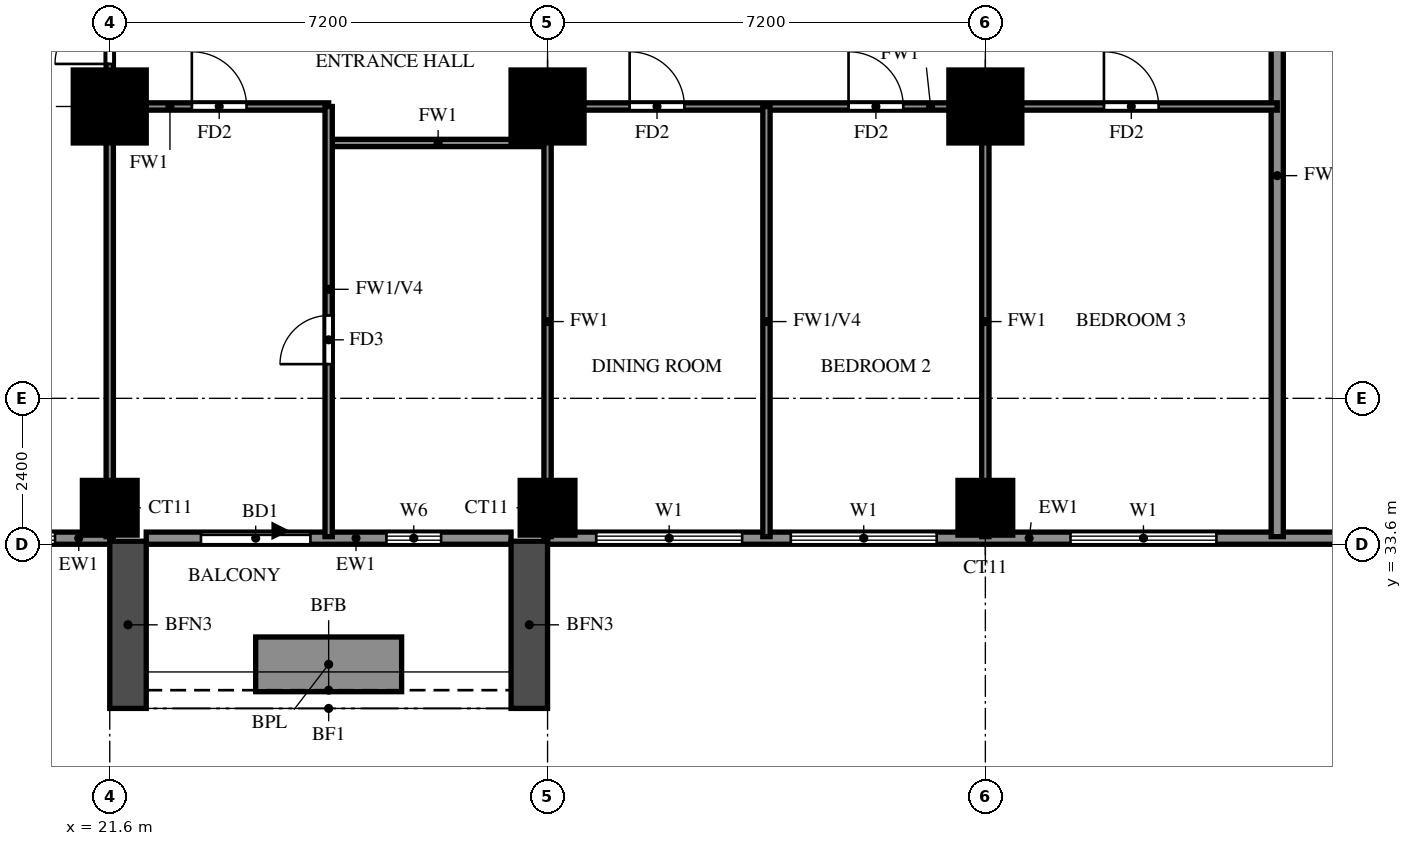
"""IFC4 building model, lengths in metres.
Left out: names, types, materials, properties, quantities, classifications, styles, units other than length and angle.
Written with IfcOpenShell. Run it as: python <this file> out.ifc"""

import sys

from ifc_helpers import new_model, si_unit, direction, frame, frame_2d, origin, origin_2d, place, context, subcontext, project, spatial, rectangle, extrude, source, transform, mapped, element, fill, save


model = new_model("IFC4")
c1 = context("Model", 3, precision=1e-05, world=origin(), true_north=direction((0.0, 1.0)))
c2 = subcontext(c1, "Body", "Model", "MODEL_VIEW")
j1 = project(units=[si_unit("LENGTHUNIT", "METRE"), si_unit("PLANEANGLEUNIT", "RADIAN")], contexts=[c1])
p1 = place(None, origin())
s1 = spatial("IfcSite", under=j1, at=p1, CompositionType="ELEMENT")
p2 = place(p1, origin())
s2 = spatial("IfcBuilding", under=s1, at=p2, CompositionType="ELEMENT")
p3 = place(p2, frame((0.0, 0.0, 93.5)))
s3 = spatial("IfcBuildingStorey", under=s2, at=p3, CompositionType="ELEMENT", Elevation=93.5)
m1 = source(origin(), c2, "Body", "SweptSolid", [
    extrude(rectangle(XDim=0.9, YDim=0.9, at=origin_2d()), origin(), (0.0, 0.0, 1.0), 3.18),
])
for number, where, z_axis, x_axis in (
    (1, (21.6, 34.2, 0.0), (0.0, 0.0, 1.0), (1.0, 0.0, 0.0)),
    (2, (28.8, 34.2, 0.0), (0.0, 0.0, 1.0), (1.0, 0.0, 0.0)),
    (3, (36.0, 34.2, 0.0), (0.0, 0.0, 1.0), (1.0, 0.0, 0.0)),
):
    element("IfcColumn", number, at=place(p3, frame(where, z_axis=z_axis, x_axis=x_axis)), inside=s3, PredefinedType="COLUMN", context=c2, shape_type="MappedRepresentation", body=[
        mapped(m1, transform((0.0, 0.0, 0.0))),
    ])
m2 = source(origin(), c2, "Body", "SweptSolid", [
    extrude(rectangle(XDim=1.2, YDim=1.2, at=origin_2d()), origin(), (0.0, 0.0, 1.0), 3.18),
])
for number, where, z_axis, x_axis in (
    (4, (21.6, 40.8, 0.0), (0.0, 0.0, 1.0), (1.0, 0.0, 0.0)),
    (5, (28.8, 40.8, 0.0), (0.0, 0.0, 1.0), (1.0, 0.0, 0.0)),
    (6, (36.0, 40.8, 0.0), (0.0, 0.0, 1.0), (1.0, 0.0, 0.0)),
):
    element("IfcColumn", number, at=place(p3, frame(where, z_axis=z_axis, x_axis=x_axis)), inside=s3, PredefinedType="COLUMN", context=c2, shape_type="MappedRepresentation", body=[
        mapped(m2, transform((0.0, 0.0, 0.0))),
    ])
p4 = place(p3, frame((18.2, 33.7, 0.0), z_axis=(0.0, 0.0, 1.0), x_axis=(1.0, 0.0, 0.0)))
e7 = element("IfcWall", 7, at=p4, inside=s3, PredefinedType="SOLIDWALL", context=c2, shape_type="SweptSolid", body=[
    extrude(rectangle(XDim=3.4, YDim=0.2, at=frame_2d((1.7, 0.0))), origin(), (0.0, 0.0, 1.0), 3.18),
])
p5 = place(p4, frame((0.7, 0.0, 0.6)))
e8 = element("IfcOpeningElement", 8, at=p5, cuts=e7, PredefinedType="OPENING", context=c2, shape_type="SweptSolid", body=[
    extrude(rectangle(XDim=1.8, YDim=2.4, at=frame_2d((0.9, 1.2))), frame((0.0, 0.11, 0.0), z_axis=(0.0, -1.0, 0.0), x_axis=(1.0, 0.0, 0.0)), (0.0, 0.0, 1.0), 0.22),
])
p6 = place(p3, frame((22.2, 33.7, 0.0), z_axis=(0.0, 0.0, 1.0), x_axis=(1.0, 0.0, 0.0)))
e9 = element("IfcWall", 9, at=p6, inside=s3, PredefinedType="SOLIDWALL", context=c2, shape_type="SweptSolid", body=[
    extrude(rectangle(XDim=6.0, YDim=0.2, at=frame_2d((3.0, 0.0))), origin(), (0.0, 0.0, 1.0), 3.18),
])
p7 = place(p6, frame((0.9, 0.0, 0.0)))
e10 = element("IfcOpeningElement", 10, at=p7, cuts=e9, PredefinedType="OPENING", context=c2, shape_type="SweptSolid", body=[
    extrude(rectangle(XDim=1.8, YDim=2.4, at=frame_2d((0.9, 1.2))), frame((0.0, 0.11, 0.0), z_axis=(0.0, -1.0, 0.0), x_axis=(1.0, 0.0, 0.0)), (0.0, 0.0, 1.0), 0.22),
])
p8 = place(p6, frame((3.95, 0.0, 1.5)))
e11 = element("IfcOpeningElement", 11, at=p8, cuts=e9, PredefinedType="OPENING", context=c2, shape_type="SweptSolid", body=[
    extrude(rectangle(XDim=0.9, YDim=0.9, at=frame_2d((0.45, 0.45))), frame((0.0, 0.11, 0.0), z_axis=(0.0, -1.0, 0.0), x_axis=(1.0, 0.0, 0.0)), (0.0, 0.0, 1.0), 0.22),
])
p9 = place(p3, frame((28.8, 33.7, 0.0), z_axis=(0.0, 0.0, 1.0), x_axis=(1.0, 0.0, 0.0)))
e12 = element("IfcWall", 12, at=p9, inside=s3, PredefinedType="SOLIDWALL", context=c2, shape_type="SweptSolid", body=[
    extrude(rectangle(XDim=13.2, YDim=0.2, at=frame_2d((6.6, 0.0))), origin(), (0.0, 0.0, 1.0), 3.18),
])
p10 = place(p9, frame((0.8, 0.0, 0.6)))
e13 = element("IfcOpeningElement", 13, at=p10, cuts=e12, PredefinedType="OPENING", context=c2, shape_type="SweptSolid", body=[
    extrude(rectangle(XDim=2.4, YDim=2.4, at=frame_2d((1.2, 1.2))), frame((0.0, 0.11, 0.0), z_axis=(0.0, -1.0, 0.0), x_axis=(1.0, 0.0, 0.0)), (0.0, 0.0, 1.0), 0.22),
])
p11 = place(p9, frame((4.0, 0.0, 0.6)))
e14 = element("IfcOpeningElement", 14, at=p11, cuts=e12, PredefinedType="OPENING", context=c2, shape_type="SweptSolid", body=[
    extrude(rectangle(XDim=2.4, YDim=2.4, at=frame_2d((1.2, 1.2))), frame((0.0, 0.11, 0.0), z_axis=(0.0, -1.0, 0.0), x_axis=(1.0, 0.0, 0.0)), (0.0, 0.0, 1.0), 0.22),
])
p12 = place(p9, frame((8.6, 0.0, 0.6)))
e15 = element("IfcOpeningElement", 15, at=p12, cuts=e12, PredefinedType="OPENING", context=c2, shape_type="SweptSolid", body=[
    extrude(rectangle(XDim=2.4, YDim=2.4, at=frame_2d((1.2, 1.2))), frame((0.0, 0.11, 0.0), z_axis=(0.0, -1.0, 0.0), x_axis=(1.0, 0.0, 0.0)), (0.0, 0.0, 1.0), 0.22),
])
for number, where, z_axis, x_axis in (
    (16, (21.9, 33.65, 0.0), (0.0, 0.0, 1.0), (0.0, -1.0, 0.0)),
    (17, (28.5, 33.65, 0.0), (0.0, 0.0, 1.0), (0.0, -1.0, 0.0)),
):
    element("IfcWall", number, at=place(p3, frame(where, z_axis=z_axis, x_axis=x_axis)), inside=s3, PredefinedType="SOLIDWALL", context=c2, shape_type="SweptSolid", body=[
        extrude(rectangle(XDim=2.75, YDim=0.6, at=frame_2d((1.375, 0.0))), origin(), (0.0, 0.0, 1.0), 2.85),
    ])
p13 = place(p3, frame((24.0, 31.625, 0.0), z_axis=(0.0, 0.0, 1.0), x_axis=(1.0, 0.0, 0.0)))
e18 = element("IfcWall", 18, at=p13, inside=s3, PredefinedType="SOLIDWALL", context=c2, shape_type="SweptSolid", body=[
    extrude(rectangle(XDim=2.4, YDim=0.9, at=frame_2d((1.2, 0.0))), origin(), (0.0, 0.0, 1.0), 0.9),
])
p14 = place(p3, frame((40.8, 33.725, 0.0), z_axis=(0.0, 0.0, 1.0), x_axis=(0.0, 1.0, 0.0)))
e19 = element("IfcWall", 19, at=p14, inside=s3, PredefinedType="SOLIDWALL", context=c2, shape_type="SweptSolid", body=[
    extrude(rectangle(XDim=11.875, YDim=0.2, at=frame_2d((5.938, 0.0))), origin(), (0.0, 0.0, 1.0), 2.28),
])
p15 = place(p3, frame((25.2, 40.2, 0.0), z_axis=(0.0, 0.0, 1.0), x_axis=(1.0, 0.0, 0.0)))
e20 = element("IfcWall", 20, at=p15, inside=s3, PredefinedType="PARTITIONING", context=c2, shape_type="SweptSolid", body=[
    extrude(rectangle(XDim=3.6, YDim=0.12, at=frame_2d((1.8, 0.0))), origin(), (0.0, 0.0, 1.0), 3.18),
])
p16 = place(p3, frame((21.6, 40.8, 0.0), z_axis=(0.0, 0.0, 1.0), x_axis=(1.0, 0.0, 0.0)))
e21 = element("IfcWall", 21, at=p16, inside=s3, PredefinedType="PARTITIONING", context=c2, shape_type="SweptSolid", body=[
    extrude(rectangle(XDim=3.6, YDim=0.12, at=frame_2d((1.8, 0.0))), origin(), (0.0, 0.0, 1.0), 3.18),
])
p17 = place(p16, frame((1.35, 0.0, 0.0)))
e22 = element("IfcOpeningElement", 22, at=p17, cuts=e21, PredefinedType="OPENING", context=c2, shape_type="SweptSolid", body=[
    extrude(rectangle(XDim=0.9, YDim=2.1, at=frame_2d((0.45, 1.05))), frame((0.0, 0.07, 0.0), z_axis=(0.0, -1.0, 0.0), x_axis=(1.0, 0.0, 0.0)), (0.0, 0.0, 1.0), 0.14),
])
p18 = place(p3, frame((28.8, 40.8, 0.0), z_axis=(0.0, 0.0, 1.0), x_axis=(1.0, 0.0, 0.0)))
e23 = element("IfcWall", 23, at=p18, inside=s3, PredefinedType="PARTITIONING", context=c2, shape_type="SweptSolid", body=[
    extrude(rectangle(XDim=12.0, YDim=0.12, at=frame_2d((6.0, 0.0))), origin(), (0.0, 0.0, 1.0), 3.18),
])
p19 = place(p18, frame((1.35, 0.0, 0.0)))
e24 = element("IfcOpeningElement", 24, at=p19, cuts=e23, PredefinedType="OPENING", context=c2, shape_type="SweptSolid", body=[
    extrude(rectangle(XDim=0.9, YDim=2.1, at=frame_2d((0.45, 1.05))), frame((0.0, 0.07, 0.0), z_axis=(0.0, -1.0, 0.0), x_axis=(1.0, 0.0, 0.0)), (0.0, 0.0, 1.0), 0.14),
])
p20 = place(p18, frame((4.95, 0.0, 0.0)))
e25 = element("IfcOpeningElement", 25, at=p20, cuts=e23, PredefinedType="OPENING", context=c2, shape_type="SweptSolid", body=[
    extrude(rectangle(XDim=0.9, YDim=2.1, at=frame_2d((0.45, 1.05))), frame((0.0, 0.07, 0.0), z_axis=(0.0, -1.0, 0.0), x_axis=(1.0, 0.0, 0.0)), (0.0, 0.0, 1.0), 0.14),
])
p21 = place(p18, frame((9.15, 0.0, 0.0)))
e26 = element("IfcOpeningElement", 26, at=p21, cuts=e23, PredefinedType="OPENING", context=c2, shape_type="SweptSolid", body=[
    extrude(rectangle(XDim=0.9, YDim=2.1, at=frame_2d((0.45, 1.05))), frame((0.0, 0.07, 0.0), z_axis=(0.0, -1.0, 0.0), x_axis=(1.0, 0.0, 0.0)), (0.0, 0.0, 1.0), 0.14),
])
p22 = place(p3, frame((21.6, 33.725, 0.0), z_axis=(0.0, 0.0, 1.0), x_axis=(0.0, 1.0, 0.0)))
e27 = element("IfcWall", 27, at=p22, inside=s3, PredefinedType="PARTITIONING", context=c2, shape_type="SweptSolid", body=[
    extrude(rectangle(XDim=28.675, YDim=0.12, at=frame_2d((14.337, 0.0))), origin(), (0.0, 0.0, 1.0), 3.18),
])
p23 = place(p22, frame((7.775, 0.0, 0.0)))
e28 = element("IfcOpeningElement", 28, at=p23, cuts=e27, PredefinedType="OPENING", context=c2, shape_type="SweptSolid", body=[
    extrude(rectangle(XDim=0.9, YDim=2.1, at=frame_2d((0.45, 1.05))), frame((0.0, 0.07, 0.0), z_axis=(0.0, -1.0, 0.0), x_axis=(1.0, 0.0, 0.0)), (0.0, 0.0, 1.0), 0.14),
])
p24 = place(p22, frame((17.125, 0.0, 0.0)))
e29 = element("IfcOpeningElement", 29, at=p24, cuts=e27, PredefinedType="OPENING", context=c2, shape_type="SweptSolid", body=[
    extrude(rectangle(XDim=1.5, YDim=2.1, at=frame_2d((0.75, 1.05))), frame((0.0, 0.07, 0.0), z_axis=(0.0, -1.0, 0.0), x_axis=(1.0, 0.0, 0.0)), (0.0, 0.0, 1.0), 0.14),
])
p25 = place(p22, frame((22.825, 0.0, 0.0)))
e30 = element("IfcOpeningElement", 30, at=p25, cuts=e27, PredefinedType="OPENING", context=c2, shape_type="SweptSolid", body=[
    extrude(rectangle(XDim=0.9, YDim=2.1, at=frame_2d((0.45, 1.05))), frame((0.0, 0.07, 0.0), z_axis=(0.0, -1.0, 0.0), x_axis=(1.0, 0.0, 0.0)), (0.0, 0.0, 1.0), 0.14),
])
p26 = place(p22, frame((26.425, 0.0, 0.0)))
e31 = element("IfcOpeningElement", 31, at=p26, cuts=e27, PredefinedType="OPENING", context=c2, shape_type="SweptSolid", body=[
    extrude(rectangle(XDim=0.9, YDim=2.1, at=frame_2d((0.45, 1.05))), frame((0.0, 0.07, 0.0), z_axis=(0.0, -1.0, 0.0), x_axis=(1.0, 0.0, 0.0)), (0.0, 0.0, 1.0), 0.14),
])
p27 = place(p3, frame((25.2, 33.725, 0.0), z_axis=(0.0, 0.0, 1.0), x_axis=(0.0, 1.0, 0.0)))
e32 = element("IfcWall", 32, at=p27, inside=s3, PredefinedType="PARTITIONING", context=c2, shape_type="SweptSolid", body=[
    extrude(rectangle(XDim=7.075, YDim=0.12, at=frame_2d((3.538, 0.0))), origin(), (0.0, 0.0, 1.0), 2.28),
])
p28 = place(p27, frame((2.837, 0.0, 0.0)))
e33 = element("IfcOpeningElement", 33, at=p28, cuts=e32, PredefinedType="OPENING", context=c2, shape_type="SweptSolid", body=[
    extrude(rectangle(XDim=0.8, YDim=2.1, at=frame_2d((0.4, 1.05))), frame((0.0, 0.07, 0.0), z_axis=(0.0, -1.0, 0.0), x_axis=(1.0, 0.0, 0.0)), (0.0, 0.0, 1.0), 0.14),
])
p29 = place(p3, frame((28.8, 33.725, 0.0), z_axis=(0.0, 0.0, 1.0), x_axis=(0.0, 1.0, 0.0)))
e34 = element("IfcWall", 34, at=p29, inside=s3, PredefinedType="PARTITIONING", context=c2, shape_type="SweptSolid", body=[
    extrude(rectangle(XDim=7.075, YDim=0.12, at=frame_2d((3.538, 0.0))), origin(), (0.0, 0.0, 1.0), 3.18),
])
p30 = place(p3, frame((32.4, 33.725, 0.0), z_axis=(0.0, 0.0, 1.0), x_axis=(0.0, 1.0, 0.0)))
e35 = element("IfcWall", 35, at=p30, inside=s3, PredefinedType="PARTITIONING", context=c2, shape_type="SweptSolid", body=[
    extrude(rectangle(XDim=7.075, YDim=0.12, at=frame_2d((3.538, 0.0))), origin(), (0.0, 0.0, 1.0), 2.28),
])
p31 = place(p3, frame((36.0, 33.725, 0.0), z_axis=(0.0, 0.0, 1.0), x_axis=(0.0, 1.0, 0.0)))
e36 = element("IfcWall", 36, at=p31, inside=s3, PredefinedType="PARTITIONING", context=c2, shape_type="SweptSolid", body=[
    extrude(rectangle(XDim=7.075, YDim=0.12, at=frame_2d((3.538, 0.0))), origin(), (0.0, 0.0, 1.0), 3.18),
])
p32 = place(p5, origin())
e37 = element("IfcWindow", 37, at=p32, inside=s3, PartitioningType="DOUBLE_PANEL_VERTICAL", PredefinedType="WINDOW", context=c2, shape_type="SweptSolid", body=[
    extrude(rectangle(XDim=1.8, YDim=2.4, at=frame_2d((0.9, 1.2))), frame((0.0, 0.03, 0.0), z_axis=(0.0, -1.0, 0.0), x_axis=(1.0, 0.0, 0.0)), (0.0, 0.0, 1.0), 0.06),
])
fill(e8, e37)
p33 = place(p7, origin())
e38 = element("IfcDoor", 38, at=p33, inside=s3, OperationType="DOUBLE_DOOR_SLIDING", PredefinedType="DOOR", context=c2, shape_type="SweptSolid", body=[
    extrude(rectangle(XDim=1.8, YDim=2.4, at=frame_2d((0.9, 1.2))), frame((0.0, 0.025, 0.0), z_axis=(0.0, -1.0, 0.0), x_axis=(1.0, 0.0, 0.0)), (0.0, 0.0, 1.0), 0.05),
])
fill(e10, e38)
p34 = place(p8, origin())
e39 = element("IfcWindow", 39, at=p34, inside=s3, PartitioningType="SINGLE_PANEL", PredefinedType="WINDOW", context=c2, shape_type="SweptSolid", body=[
    extrude(rectangle(XDim=0.9, YDim=0.9, at=frame_2d((0.45, 0.45))), frame((0.0, 0.03, 0.0), z_axis=(0.0, -1.0, 0.0), x_axis=(1.0, 0.0, 0.0)), (0.0, 0.0, 1.0), 0.06),
])
fill(e11, e39)
p35 = place(p10, origin())
e40 = element("IfcWindow", 40, at=p35, inside=s3, PartitioningType="DOUBLE_PANEL_VERTICAL", PredefinedType="WINDOW", context=c2, shape_type="SweptSolid", body=[
    extrude(rectangle(XDim=2.4, YDim=2.4, at=frame_2d((1.2, 1.2))), frame((0.0, 0.03, 0.0), z_axis=(0.0, -1.0, 0.0), x_axis=(1.0, 0.0, 0.0)), (0.0, 0.0, 1.0), 0.06),
])
fill(e13, e40)
p36 = place(p11, origin())
e41 = element("IfcWindow", 41, at=p36, inside=s3, PartitioningType="DOUBLE_PANEL_VERTICAL", PredefinedType="WINDOW", context=c2, shape_type="SweptSolid", body=[
    extrude(rectangle(XDim=2.4, YDim=2.4, at=frame_2d((1.2, 1.2))), frame((0.0, 0.03, 0.0), z_axis=(0.0, -1.0, 0.0), x_axis=(1.0, 0.0, 0.0)), (0.0, 0.0, 1.0), 0.06),
])
fill(e14, e41)
p37 = place(p12, origin())
e42 = element("IfcWindow", 42, at=p37, inside=s3, PartitioningType="DOUBLE_PANEL_VERTICAL", PredefinedType="WINDOW", context=c2, shape_type="SweptSolid", body=[
    extrude(rectangle(XDim=2.4, YDim=2.4, at=frame_2d((1.2, 1.2))), frame((0.0, 0.03, 0.0), z_axis=(0.0, -1.0, 0.0), x_axis=(1.0, 0.0, 0.0)), (0.0, 0.0, 1.0), 0.06),
])
fill(e15, e42)
p38 = place(p23, origin())
e43 = element("IfcDoor", 43, at=p38, inside=s3, OperationType="SINGLE_SWING_RIGHT", PredefinedType="DOOR", context=c2, shape_type="SweptSolid", body=[
    extrude(rectangle(XDim=0.9, YDim=2.1, at=frame_2d((0.45, 1.05))), frame((0.0, 0.025, 0.0), z_axis=(0.0, -1.0, 0.0), x_axis=(1.0, 0.0, 0.0)), (0.0, 0.0, 1.0), 0.05),
])
fill(e28, e43)
p39 = place(p17, origin())
e44 = element("IfcDoor", 44, at=p39, inside=s3, OperationType="SINGLE_SWING_LEFT", PredefinedType="DOOR", context=c2, shape_type="SweptSolid", body=[
    extrude(rectangle(XDim=0.9, YDim=2.1, at=frame_2d((0.45, 1.05))), frame((0.0, 0.025, 0.0), z_axis=(0.0, -1.0, 0.0), x_axis=(1.0, 0.0, 0.0)), (0.0, 0.0, 1.0), 0.05),
])
fill(e22, e44)
p40 = place(p28, origin())
e45 = element("IfcDoor", 45, at=p40, inside=s3, OperationType="SINGLE_SWING_RIGHT", PredefinedType="DOOR", context=c2, shape_type="SweptSolid", body=[
    extrude(rectangle(XDim=0.8, YDim=2.1, at=frame_2d((0.4, 1.05))), frame((0.0, 0.025, 0.0), z_axis=(0.0, -1.0, 0.0), x_axis=(1.0, 0.0, 0.0)), (0.0, 0.0, 1.0), 0.05),
])
fill(e33, e45)
p41 = place(p19, origin())
e46 = element("IfcDoor", 46, at=p41, inside=s3, OperationType="SINGLE_SWING_LEFT", PredefinedType="DOOR", context=c2, shape_type="SweptSolid", body=[
    extrude(rectangle(XDim=0.9, YDim=2.1, at=frame_2d((0.45, 1.05))), frame((0.0, 0.025, 0.0), z_axis=(0.0, -1.0, 0.0), x_axis=(1.0, 0.0, 0.0)), (0.0, 0.0, 1.0), 0.05),
])
fill(e24, e46)
p42 = place(p20, origin())
e47 = element("IfcDoor", 47, at=p42, inside=s3, OperationType="SINGLE_SWING_LEFT", PredefinedType="DOOR", context=c2, shape_type="SweptSolid", body=[
    extrude(rectangle(XDim=0.9, YDim=2.1, at=frame_2d((0.45, 1.05))), frame((0.0, 0.025, 0.0), z_axis=(0.0, -1.0, 0.0), x_axis=(1.0, 0.0, 0.0)), (0.0, 0.0, 1.0), 0.05),
])
fill(e25, e47)
p43 = place(p21, origin())
e48 = element("IfcDoor", 48, at=p43, inside=s3, OperationType="SINGLE_SWING_RIGHT", PredefinedType="DOOR", context=c2, shape_type="SweptSolid", body=[
    extrude(rectangle(XDim=0.9, YDim=2.1, at=frame_2d((0.45, 1.05))), frame((0.0, 0.025, 0.0), z_axis=(0.0, -1.0, 0.0), x_axis=(1.0, 0.0, 0.0)), (0.0, 0.0, 1.0), 0.05),
])
fill(e26, e48)
save(model, sys.argv[1])
